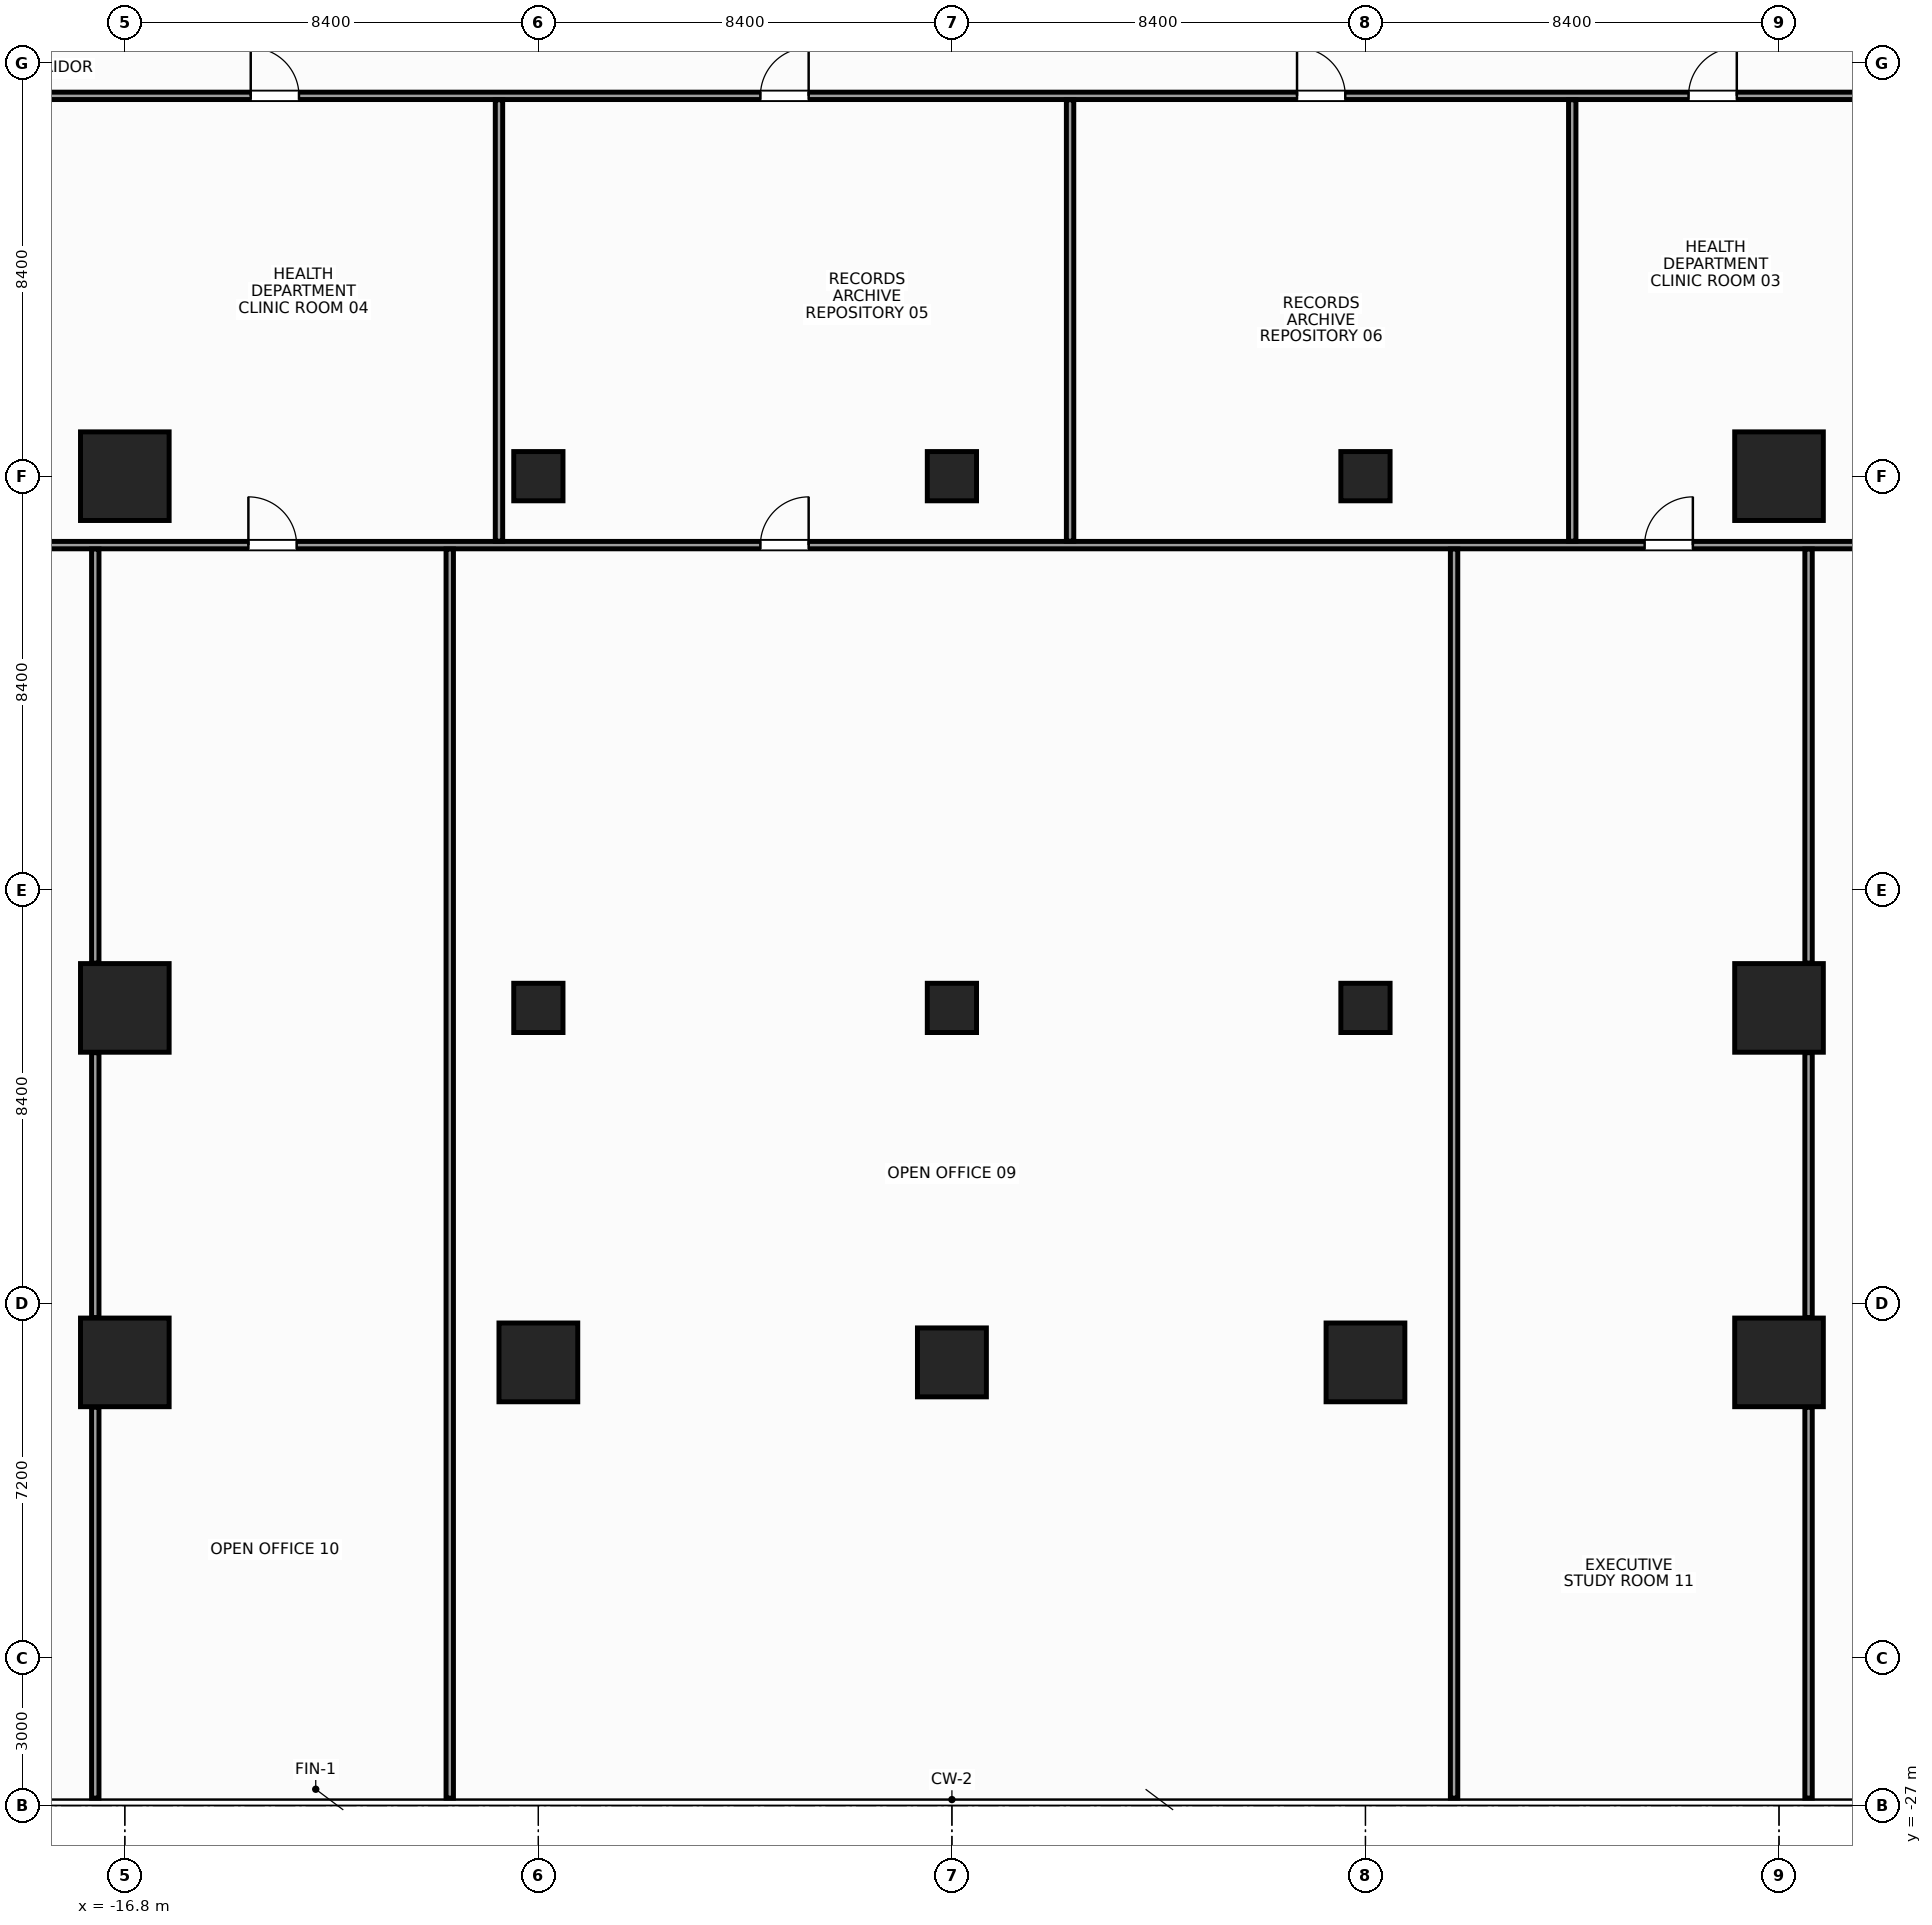
"""IFC4 building model, lengths in metres.
Left out: names, types, materials, properties, quantities, classifications, styles, units other than length and angle.
Written with IfcOpenShell. Run it as: python <this file> out.ifc"""

import sys

from ifc_helpers import new_model, si_unit, direction, frame, frame_2d, origin, origin_2d, place, context, subcontext, project, spatial, rectangle, hollow_rectangle, extrude, source, transform, mapped, element, fill, save


model = new_model("IFC4")
c1 = context("Model", 3, precision=1e-05, world=origin(), true_north=direction((0.0, 1.0)))
c2 = subcontext(c1, "Body", "Model", "MODEL_VIEW")
j1 = project(units=[si_unit("LENGTHUNIT", "METRE"), si_unit("PLANEANGLEUNIT", "RADIAN")], contexts=[c1])
p1 = place(None, origin())
s1 = spatial("IfcSite", under=j1, at=p1, CompositionType="ELEMENT")
p2 = place(p1, origin())
s2 = spatial("IfcBuilding", under=s1, at=p2, CompositionType="ELEMENT")
p3 = place(p2, frame((0.0, 0.0, 52.4)))
s3 = spatial("IfcBuildingStorey", under=s2, at=p3, CompositionType="ELEMENT", Elevation=52.4)
m1 = source(origin(), c2, "Body", "SweptSolid", [
    extrude(rectangle(XDim=1.8, YDim=1.8, at=origin_2d()), origin(), (0.0, 0.0, 1.0), 3.6),
])
for number, where, z_axis, x_axis in (
    (1, (-16.8, -18.0, 0.0), (0.0, 0.0, 1.0), (1.0, 0.0, 0.0)),
    (2, (-16.8, -10.8, 0.0), (0.0, 0.0, 1.0), (1.0, 0.0, 0.0)),
    (3, (-16.8, 0.0, 0.0), (0.0, 0.0, 1.0), (1.0, 0.0, 0.0)),
    (4, (16.8, -18.0, 0.0), (0.0, 0.0, 1.0), (1.0, 0.0, 0.0)),
    (5, (16.8, -10.8, 0.0), (0.0, 0.0, 1.0), (1.0, 0.0, 0.0)),
    (6, (16.8, 0.0, 0.0), (0.0, 0.0, 1.0), (1.0, 0.0, 0.0)),
):
    element("IfcColumn", number, at=place(p3, frame(where, z_axis=z_axis, x_axis=x_axis)), inside=s3, PredefinedType="COLUMN", context=c2, shape_type="MappedRepresentation", body=[
        mapped(m1, transform((0.0, 0.0, 0.0), x_axis=(1.0, 0.0, 0.0), y_axis=(0.0, 1.0, 0.0), z_axis=(0.0, 0.0, 1.0), scale=1.0)),
    ])
m2 = source(origin(), c2, "Body", "SweptSolid", [
    extrude(rectangle(XDim=1.6, YDim=1.6, at=origin_2d()), origin(), (0.0, 0.0, 1.0), 3.6),
])
p4 = place(p3, frame((-8.4, -18.0, 0.0), z_axis=(0.0, 0.0, 1.0), x_axis=(1.0, 0.0, 0.0)))
e7 = element("IfcColumn", 7, at=p4, inside=s3, PredefinedType="COLUMN", context=c2, shape_type="MappedRepresentation", body=[
    mapped(m2, transform((0.0, 0.0, 0.0), x_axis=(1.0, 0.0, 0.0), y_axis=(0.0, 1.0, 0.0), z_axis=(0.0, 0.0, 1.0), scale=1.0)),
])
m3 = source(origin(), c2, "Body", "SweptSolid", [
    extrude(hollow_rectangle(XDim=1.0, YDim=1.0, WallThickness=0.045, at=origin_2d()), origin(), (0.0, 0.0, 1.0), 3.6),
])
for number, where, z_axis, x_axis in (
    (8, (-8.4, 0.0, 0.0), (0.0, 0.0, 1.0), (1.0, 0.0, 0.0)),
    (9, (-8.4, -10.8, 0.0), (0.0, 0.0, 1.0), (1.0, 0.0, 0.0)),
):
    element("IfcColumn", number, at=place(p3, frame(where, z_axis=z_axis, x_axis=x_axis)), inside=s3, PredefinedType="COLUMN", context=c2, shape_type="MappedRepresentation", body=[
        mapped(m3, transform((0.0, 0.0, 0.0), x_axis=(1.0, 0.0, 0.0), y_axis=(0.0, 1.0, 0.0), z_axis=(0.0, 0.0, 1.0), scale=1.0)),
    ])
p5 = place(p3, frame((8.4, -18.0, 0.0), z_axis=(0.0, 0.0, 1.0), x_axis=(1.0, 0.0, 0.0)))
e10 = element("IfcColumn", 10, at=p5, inside=s3, PredefinedType="COLUMN", context=c2, shape_type="MappedRepresentation", body=[
    mapped(m2, transform((0.0, 0.0, 0.0), x_axis=(1.0, 0.0, 0.0), y_axis=(0.0, 1.0, 0.0), z_axis=(0.0, 0.0, 1.0), scale=1.0)),
])
for number, where, z_axis, x_axis in (
    (11, (8.4, 0.0, 0.0), (0.0, 0.0, 1.0), (1.0, 0.0, 0.0)),
    (12, (8.4, -10.8, 0.0), (0.0, 0.0, 1.0), (1.0, 0.0, 0.0)),
):
    element("IfcColumn", number, at=place(p3, frame(where, z_axis=z_axis, x_axis=x_axis)), inside=s3, PredefinedType="COLUMN", context=c2, shape_type="MappedRepresentation", body=[
        mapped(m3, transform((0.0, 0.0, 0.0), x_axis=(1.0, 0.0, 0.0), y_axis=(0.0, 1.0, 0.0), z_axis=(0.0, 0.0, 1.0), scale=1.0)),
    ])
m4 = source(origin(), c2, "Body", "SweptSolid", [
    extrude(rectangle(XDim=1.4, YDim=1.4, at=origin_2d()), origin(), (0.0, 0.0, 1.0), 3.6),
])
p6 = place(p3, frame((0.0, -18.0, 0.0), z_axis=(0.0, 0.0, 1.0), x_axis=(1.0, 0.0, 0.0)))
e13 = element("IfcColumn", 13, at=p6, inside=s3, PredefinedType="COLUMN", context=c2, shape_type="MappedRepresentation", body=[
    mapped(m4, transform((0.0, 0.0, 0.0), x_axis=(1.0, 0.0, 0.0), y_axis=(0.0, 1.0, 0.0), z_axis=(0.0, 0.0, 1.0), scale=1.0)),
])
m5 = source(origin(), c2, "Body", "SweptSolid", [
    extrude(rectangle(XDim=1.0, YDim=1.0, at=origin_2d()), origin(), (0.0, 0.0, 1.0), 3.6),
])
for number, where, z_axis, x_axis in (
    (14, (0.0, -10.8, 0.0), (0.0, 0.0, 1.0), (1.0, 0.0, 0.0)),
    (15, (0.0, 0.0, 0.0), (0.0, 0.0, 1.0), (1.0, 0.0, 0.0)),
):
    element("IfcColumn", number, at=place(p3, frame(where, z_axis=z_axis, x_axis=x_axis)), inside=s3, PredefinedType="COLUMN", context=c2, shape_type="MappedRepresentation", body=[
        mapped(m5, transform((0.0, 0.0, 0.0), x_axis=(1.0, 0.0, 0.0), y_axis=(0.0, 1.0, 0.0), z_axis=(0.0, 0.0, 1.0), scale=1.0)),
    ])
m6 = source(origin(), c2, "Body", "SweptSolid", [
    extrude(rectangle(XDim=36.7, YDim=0.15, at=frame_2d((18.35, 0.0))), origin(), (0.0, 0.0, 1.0), 2.745),
])
p7 = place(p3, frame((-18.35, 7.725, 0.0), z_axis=(0.0, 0.0, 1.0), x_axis=(1.0, 0.0, 0.0)))
e16 = element("IfcWall", 16, at=p7, inside=s3, PredefinedType="PARTITIONING", context=c2, shape_type="MappedRepresentation", body=[
    mapped(m6, transform((0.0, 0.0, 0.0), x_axis=(1.0, 0.0, 0.0), y_axis=(0.0, 1.0, 0.0), z_axis=(0.0, 0.0, 1.0), scale=1.0)),
])
p8 = place(p7, frame((33.312, 0.0, 0.0)))
e17 = element("IfcOpeningElement", 17, at=p8, cuts=e16, PredefinedType="OPENING", context=c2, shape_type="SweptSolid", body=[
    extrude(rectangle(XDim=0.98, YDim=2.15, at=frame_2d((0.49, 1.075))), frame((0.0, 0.087, 0.0), z_axis=(0.0, -1.0, 0.0), x_axis=(1.0, 0.0, 0.0)), (0.0, 0.0, 1.0), 0.174),
])
p9 = place(p7, frame((4.107, 0.0, 0.0)))
e18 = element("IfcOpeningElement", 18, at=p9, cuts=e16, PredefinedType="OPENING", context=c2, shape_type="SweptSolid", body=[
    extrude(rectangle(XDim=0.98, YDim=2.15, at=frame_2d((0.49, 1.075))), frame((0.0, 0.087, 0.0), z_axis=(0.0, -1.0, 0.0), x_axis=(1.0, 0.0, 0.0)), (0.0, 0.0, 1.0), 0.174),
])
p10 = place(p7, frame((14.46, 0.0, 0.0)))
e19 = element("IfcOpeningElement", 19, at=p10, cuts=e16, PredefinedType="OPENING", context=c2, shape_type="SweptSolid", body=[
    extrude(rectangle(XDim=0.98, YDim=2.15, at=frame_2d((0.49, 1.075))), frame((0.0, 0.087, 0.0), z_axis=(0.0, -1.0, 0.0), x_axis=(1.0, 0.0, 0.0)), (0.0, 0.0, 1.0), 0.174),
])
p11 = place(p7, frame((25.36, 0.0, 0.0)))
e20 = element("IfcOpeningElement", 20, at=p11, cuts=e16, PredefinedType="OPENING", context=c2, shape_type="SweptSolid", body=[
    extrude(rectangle(XDim=0.98, YDim=2.15, at=frame_2d((0.49, 1.075))), frame((0.0, 0.087, 0.0), z_axis=(0.0, -1.0, 0.0), x_axis=(1.0, 0.0, 0.0)), (0.0, 0.0, 1.0), 0.174),
])
m7 = source(origin(), c2, "Body", "SweptSolid", [
    extrude(rectangle(XDim=36.69, YDim=0.15, at=frame_2d((18.345, 0.0))), origin(), (0.0, 0.0, 1.0), 2.745),
])
p12 = place(p3, frame((-18.345, -1.4, 0.0), z_axis=(0.0, 0.0, 1.0), x_axis=(1.0, 0.0, 0.0)))
e21 = element("IfcWall", 21, at=p12, inside=s3, PredefinedType="PARTITIONING", context=c2, shape_type="MappedRepresentation", body=[
    mapped(m7, transform((0.0, 0.0, 0.0), x_axis=(1.0, 0.0, 0.0), y_axis=(0.0, 1.0, 0.0), z_axis=(0.0, 0.0, 1.0), scale=1.0)),
])
p13 = place(p12, frame((14.455, 0.0, 0.0)))
e22 = element("IfcOpeningElement", 22, at=p13, cuts=e21, PredefinedType="OPENING", context=c2, shape_type="SweptSolid", body=[
    extrude(rectangle(XDim=0.98, YDim=2.15, at=frame_2d((0.49, 1.075))), frame((0.0, 0.087, 0.0), z_axis=(0.0, -1.0, 0.0), x_axis=(1.0, 0.0, 0.0)), (0.0, 0.0, 1.0), 0.174),
])
p14 = place(p12, frame((4.055, 0.0, 0.0)))
e23 = element("IfcOpeningElement", 23, at=p14, cuts=e21, PredefinedType="OPENING", context=c2, shape_type="SweptSolid", body=[
    extrude(rectangle(XDim=0.98, YDim=2.15, at=frame_2d((0.49, 1.075))), frame((0.0, 0.087, 0.0), z_axis=(0.0, -1.0, 0.0), x_axis=(1.0, 0.0, 0.0)), (0.0, 0.0, 1.0), 0.174),
])
p15 = place(p12, frame((32.415, 0.0, 0.0)))
e24 = element("IfcOpeningElement", 24, at=p15, cuts=e21, PredefinedType="OPENING", context=c2, shape_type="SweptSolid", body=[
    extrude(rectangle(XDim=0.98, YDim=2.15, at=frame_2d((0.49, 1.075))), frame((0.0, 0.087, 0.0), z_axis=(0.0, -1.0, 0.0), x_axis=(1.0, 0.0, 0.0)), (0.0, 0.0, 1.0), 0.174),
])
m8 = source(origin(), c2, "Body", "SweptSolid", [
    extrude(rectangle(XDim=8.965, YDim=0.15, at=frame_2d((4.482, 0.0))), origin(), (0.0, 0.0, 1.0), 2.645),
])
for number, where, z_axis, x_axis in (
    (25, (-9.2, -1.32, 0.0), (0.0, 0.0, 1.0), (0.0, 1.0, 0.0)),
    (26, (2.4, -1.32, 0.0), (0.0, 0.0, 1.0), (0.0, 1.0, 0.0)),
    (27, (12.6, -1.32, 0.0), (0.0, 0.0, 1.0), (0.0, 1.0, 0.0)),
):
    element("IfcWall", number, at=place(p3, frame(where, z_axis=z_axis, x_axis=x_axis)), inside=s3, PredefinedType="PARTITIONING", context=c2, shape_type="MappedRepresentation", body=[
        mapped(m8, transform((0.0, 0.0, 0.0), x_axis=(1.0, 0.0, 0.0), y_axis=(0.0, 1.0, 0.0), z_axis=(0.0, 0.0, 1.0), scale=1.0)),
    ])
m9 = source(origin(), c2, "Body", "SweptSolid", [
    extrude(rectangle(XDim=7.94, YDim=0.15, at=frame_2d((3.97, 0.0))), origin(), (0.0, 0.0, 1.0), 3.36),
])
p16 = place(p3, frame((-17.4, -26.85, 0.0), z_axis=(0.0, 0.0, 1.0), x_axis=(0.0, 1.0, 0.0)))
e28 = element("IfcWall", 28, at=p16, inside=s3, PredefinedType="PARTITIONING", context=c2, shape_type="MappedRepresentation", body=[
    mapped(m9, transform((0.0, 0.0, 0.0), x_axis=(1.0, 0.0, 0.0), y_axis=(0.0, 1.0, 0.0), z_axis=(0.0, 0.0, 1.0), scale=1.0)),
])
m10 = source(origin(), c2, "Body", "SweptSolid", [
    extrude(rectangle(XDim=5.38, YDim=0.15, at=frame_2d((2.69, 0.0))), origin(), (0.0, 0.0, 1.0), 3.36),
])
p17 = place(p3, frame((-17.4, -17.09, 0.0), z_axis=(0.0, 0.0, 1.0), x_axis=(0.0, 1.0, 0.0)))
e29 = element("IfcWall", 29, at=p17, inside=s3, PredefinedType="PARTITIONING", context=c2, shape_type="MappedRepresentation", body=[
    mapped(m10, transform((0.0, 0.0, 0.0), x_axis=(1.0, 0.0, 0.0), y_axis=(0.0, 1.0, 0.0), z_axis=(0.0, 0.0, 1.0), scale=1.0)),
])
m11 = source(origin(), c2, "Body", "SweptSolid", [
    extrude(rectangle(XDim=8.41, YDim=0.15, at=frame_2d((4.205, 0.0))), origin(), (0.0, 0.0, 1.0), 3.36),
])
p18 = place(p3, frame((-17.4, -9.89, 0.0), z_axis=(0.0, 0.0, 1.0), x_axis=(0.0, 1.0, 0.0)))
e30 = element("IfcWall", 30, at=p18, inside=s3, PredefinedType="PARTITIONING", context=c2, shape_type="MappedRepresentation", body=[
    mapped(m11, transform((0.0, 0.0, 0.0), x_axis=(1.0, 0.0, 0.0), y_axis=(0.0, 1.0, 0.0), z_axis=(0.0, 0.0, 1.0), scale=1.0)),
])
m12 = source(origin(), c2, "Body", "SweptSolid", [
    extrude(rectangle(XDim=25.37, YDim=0.15, at=frame_2d((12.685, 0.0))), origin(), (0.0, 0.0, 1.0), 2.745),
])
for number, where, z_axis, x_axis in (
    (31, (-10.2, -26.85, 0.0), (0.0, 0.0, 1.0), (0.0, 1.0, 0.0)),
    (32, (10.2, -26.85, 0.0), (0.0, 0.0, 1.0), (0.0, 1.0, 0.0)),
):
    element("IfcWall", number, at=place(p3, frame(where, z_axis=z_axis, x_axis=x_axis)), inside=s3, PredefinedType="PARTITIONING", context=c2, shape_type="MappedRepresentation", body=[
        mapped(m12, transform((0.0, 0.0, 0.0), x_axis=(1.0, 0.0, 0.0), y_axis=(0.0, 1.0, 0.0), z_axis=(0.0, 0.0, 1.0), scale=1.0)),
    ])
p19 = place(p3, frame((17.4, -26.85, 0.0), z_axis=(0.0, 0.0, 1.0), x_axis=(0.0, 1.0, 0.0)))
e33 = element("IfcWall", 33, at=p19, inside=s3, PredefinedType="PARTITIONING", context=c2, shape_type="MappedRepresentation", body=[
    mapped(m9, transform((0.0, 0.0, 0.0), x_axis=(1.0, 0.0, 0.0), y_axis=(0.0, 1.0, 0.0), z_axis=(0.0, 0.0, 1.0), scale=1.0)),
])
p20 = place(p3, frame((17.4, -17.09, 0.0), z_axis=(0.0, 0.0, 1.0), x_axis=(0.0, 1.0, 0.0)))
e34 = element("IfcWall", 34, at=p20, inside=s3, PredefinedType="PARTITIONING", context=c2, shape_type="MappedRepresentation", body=[
    mapped(m10, transform((0.0, 0.0, 0.0), x_axis=(1.0, 0.0, 0.0), y_axis=(0.0, 1.0, 0.0), z_axis=(0.0, 0.0, 1.0), scale=1.0)),
])
p21 = place(p3, frame((17.4, -9.89, 0.0), z_axis=(0.0, 0.0, 1.0), x_axis=(0.0, 1.0, 0.0)))
e35 = element("IfcWall", 35, at=p21, inside=s3, PredefinedType="PARTITIONING", context=c2, shape_type="MappedRepresentation", body=[
    mapped(m11, transform((0.0, 0.0, 0.0), x_axis=(1.0, 0.0, 0.0), y_axis=(0.0, 1.0, 0.0), z_axis=(0.0, 0.0, 1.0), scale=1.0)),
])
m13 = source(origin(), c2, "Body", "SweptSolid", [
    extrude(rectangle(XDim=0.98, YDim=2.15, at=frame_2d((0.49, 1.075))), frame((0.0, 0.025, 0.0), z_axis=(0.0, -1.0, 0.0), x_axis=(1.0, 0.0, 0.0)), (0.0, 0.0, 1.0), 0.05),
])
p22 = place(p8, origin())
e36 = element("IfcDoor", 36, at=p22, inside=s3, OperationType="SINGLE_SWING_RIGHT", PredefinedType="DOOR", context=c2, shape_type="MappedRepresentation", body=[
    mapped(m13, transform((0.0, 0.0, 0.0), x_axis=(1.0, 0.0, 0.0), y_axis=(0.0, 1.0, 0.0), z_axis=(0.0, 0.0, 1.0), scale=1.0)),
])
fill(e17, e36)
p23 = place(p9, origin())
e37 = element("IfcDoor", 37, at=p23, inside=s3, OperationType="SINGLE_SWING_LEFT", PredefinedType="DOOR", context=c2, shape_type="MappedRepresentation", body=[
    mapped(m13, transform((0.0, 0.0, 0.0), x_axis=(1.0, 0.0, 0.0), y_axis=(0.0, 1.0, 0.0), z_axis=(0.0, 0.0, 1.0), scale=1.0)),
])
fill(e18, e37)
p24 = place(p10, origin())
e38 = element("IfcDoor", 38, at=p24, inside=s3, OperationType="SINGLE_SWING_RIGHT", PredefinedType="DOOR", context=c2, shape_type="MappedRepresentation", body=[
    mapped(m13, transform((0.0, 0.0, 0.0), x_axis=(1.0, 0.0, 0.0), y_axis=(0.0, 1.0, 0.0), z_axis=(0.0, 0.0, 1.0), scale=1.0)),
])
fill(e19, e38)
p25 = place(p11, origin())
e39 = element("IfcDoor", 39, at=p25, inside=s3, OperationType="SINGLE_SWING_LEFT", PredefinedType="DOOR", context=c2, shape_type="MappedRepresentation", body=[
    mapped(m13, transform((0.0, 0.0, 0.0), x_axis=(1.0, 0.0, 0.0), y_axis=(0.0, 1.0, 0.0), z_axis=(0.0, 0.0, 1.0), scale=1.0)),
])
fill(e20, e39)
p26 = place(p13, origin())
e40 = element("IfcDoor", 40, at=p26, inside=s3, OperationType="SINGLE_SWING_RIGHT", PredefinedType="DOOR", context=c2, shape_type="MappedRepresentation", body=[
    mapped(m13, transform((0.0, 0.0, 0.0), x_axis=(1.0, 0.0, 0.0), y_axis=(0.0, 1.0, 0.0), z_axis=(0.0, 0.0, 1.0), scale=1.0)),
])
fill(e22, e40)
p27 = place(p14, origin())
e41 = element("IfcDoor", 41, at=p27, inside=s3, OperationType="SINGLE_SWING_LEFT", PredefinedType="DOOR", context=c2, shape_type="MappedRepresentation", body=[
    mapped(m13, transform((0.0, 0.0, 0.0), x_axis=(1.0, 0.0, 0.0), y_axis=(0.0, 1.0, 0.0), z_axis=(0.0, 0.0, 1.0), scale=1.0)),
])
fill(e23, e41)
p28 = place(p15, origin())
e42 = element("IfcDoor", 42, at=p28, inside=s3, OperationType="SINGLE_SWING_RIGHT", PredefinedType="DOOR", context=c2, shape_type="MappedRepresentation", body=[
    mapped(m13, transform((0.0, 0.0, 0.0), x_axis=(1.0, 0.0, 0.0), y_axis=(0.0, 1.0, 0.0), z_axis=(0.0, 0.0, 1.0), scale=1.0)),
])
fill(e24, e42)
save(model, sys.argv[1])
